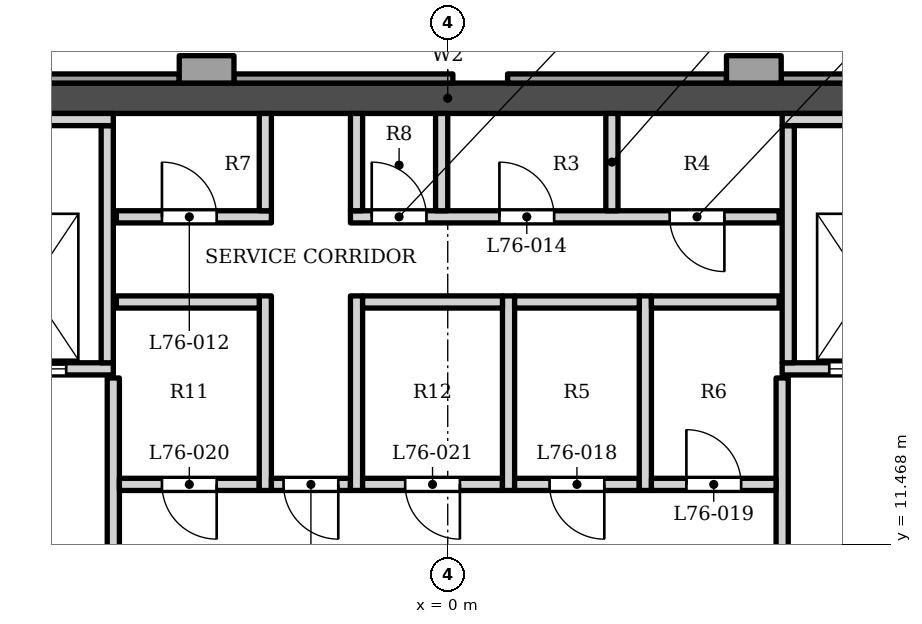
"""IFC4 building model, lengths in metres.
Left out: names, types, materials, properties, quantities, classifications, styles, units other than length and angle.
Written with IfcOpenShell. Run it as: python <this file> out.ifc"""

import sys

from ifc_helpers import new_model, si_unit, direction, frame, frame_2d, origin, place, context, subcontext, project, spatial, polyline, rectangle, outline, extrude, element, fill, save


model = new_model("IFC4")
c1 = context("Model", 3, precision=1e-05, world=origin(), true_north=direction((0.0, 1.0)))
c2 = subcontext(c1, "Body", "Model", "MODEL_VIEW")
j1 = project(units=[si_unit("LENGTHUNIT", "METRE"), si_unit("PLANEANGLEUNIT", "RADIAN")], contexts=[c1])
p1 = place(None, origin())
s1 = spatial("IfcSite", under=j1, at=p1, CompositionType="ELEMENT")
p2 = place(p1, origin())
s2 = spatial("IfcBuilding", under=s1, at=p2, CompositionType="ELEMENT")
p3 = place(p2, frame((0.0, 0.0, 325.5)))
s3 = spatial("IfcBuildingStorey", under=s2, at=p3, CompositionType="ELEMENT", Elevation=325.5)
p4 = place(p3, frame((-12.1, 18.802, 0.0), z_axis=(0.0, 0.0, 1.0), x_axis=(1.0, 0.0, 0.0)))
e1 = element("IfcWall", 1, at=p4, inside=s3, PredefinedType="SHEAR", context=c2, shape_type="SweptSolid", body=[
    extrude(rectangle(XDim=24.2, YDim=0.5, at=frame_2d((12.1, 0.0))), origin(), (0.0, 0.0, 1.0), 5.0),
])
p5 = place(p3, origin())
e2 = element("IfcWall", 2, at=p5, inside=s3, PredefinedType="SOLIDWALL", context=c2, shape_type="SweptSolid", body=[
    extrude(outline(polyline([(4.584, 19.502), (4.584, 19.052), (5.484, 19.052), (5.484, 19.502), (4.584, 19.502)])), origin(), (0.0, 0.0, 1.0), 3.8),
])
p6 = place(p3, origin())
e3 = element("IfcWall", 3, at=p6, inside=s3, PredefinedType="SOLIDWALL", context=c2, shape_type="SweptSolid", body=[
    extrude(outline(polyline([(-4.416, 19.502), (-4.416, 19.052), (-3.516, 19.052), (-3.516, 19.502), (-4.416, 19.502)])), origin(), (0.0, 0.0, 1.0), 3.8),
])
p7 = place(p3, origin())
e4 = element("IfcWall", 4, at=p7, inside=s3, PredefinedType="ELEMENTEDWALL", context=c2, shape_type="SweptSolid", body=[
    extrude(outline(polyline([(9.084, 19.203), (5.484, 19.203), (5.484, 19.052), (9.084, 19.052), (9.084, 19.203)])), origin(), (0.0, 0.0, 1.0), 3.8),
])
p8 = place(p3, origin())
e5 = element("IfcWall", 5, at=p8, inside=s3, PredefinedType="ELEMENTEDWALL", context=c2, shape_type="SweptSolid", body=[
    extrude(outline(polyline([(4.584, 19.203), (0.984, 19.203), (0.984, 19.052), (4.584, 19.052), (4.584, 19.203)])), origin(), (0.0, 0.0, 1.0), 3.8),
])
p9 = place(p3, origin())
e6 = element("IfcWall", 6, at=p9, inside=s3, PredefinedType="ELEMENTEDWALL", context=c2, shape_type="SweptSolid", body=[
    extrude(outline(polyline([(0.084, 19.203), (-3.516, 19.203), (-3.516, 19.052), (0.084, 19.052), (0.084, 19.203)])), origin(), (0.0, 0.0, 1.0), 3.8),
])
p10 = place(p3, origin())
e7 = element("IfcWall", 7, at=p10, inside=s3, PredefinedType="ELEMENTEDWALL", context=c2, shape_type="SweptSolid", body=[
    extrude(outline(polyline([(-4.416, 19.203), (-8.016, 19.203), (-8.016, 19.052), (-4.416, 19.052), (-4.416, 19.203)])), origin(), (0.0, 0.0, 1.0), 3.8),
])
p11 = place(p3, frame((-5.5, 6.353, 0.0), z_axis=(0.0, 0.0, 1.0), x_axis=(0.0, 1.0, 0.0)))
e8 = element("IfcWall", 8, at=p11, inside=s3, PredefinedType="SOLIDWALL", context=c2, shape_type="SweptSolid", body=[
    extrude(rectangle(XDim=7.85, YDim=0.2, at=frame_2d((3.925, 0.0))), origin(), (0.0, 0.0, 1.0), 4.8),
])
p12 = place(p11, frame((3.6, 0.0, 0.0)))
e9 = element("IfcOpeningElement", 9, at=p12, cuts=e8, PredefinedType="OPENING", context=c2, shape_type="SweptSolid", body=[
    extrude(rectangle(XDim=1.4, YDim=2.1, at=frame_2d((0.7, 1.05))), frame((0.0, 0.11, 0.0), z_axis=(0.0, -1.0, 0.0), x_axis=(1.0, 0.0, 0.0)), (0.0, 0.0, 1.0), 0.22),
])
p13 = place(p3, frame((5.5, 6.353, 0.0), z_axis=(0.0, 0.0, 1.0), x_axis=(0.0, 1.0, 0.0)))
e10 = element("IfcWall", 10, at=p13, inside=s3, PredefinedType="SOLIDWALL", context=c2, shape_type="SweptSolid", body=[
    extrude(rectangle(XDim=7.85, YDim=0.2, at=frame_2d((3.925, 0.0))), origin(), (0.0, 0.0, 1.0), 4.8),
])
p14 = place(p13, frame((3.6, 0.0, 0.0)))
e11 = element("IfcOpeningElement", 11, at=p14, cuts=e10, PredefinedType="OPENING", context=c2, shape_type="SweptSolid", body=[
    extrude(rectangle(XDim=1.4, YDim=2.1, at=frame_2d((0.7, 1.05))), frame((0.0, 0.11, 0.0), z_axis=(0.0, -1.0, 0.0), x_axis=(1.0, 0.0, 0.0)), (0.0, 0.0, 1.0), 0.22),
])
p15 = place(p3, frame((-5.4, 12.453, 0.0), z_axis=(0.0, 0.0, 1.0), x_axis=(1.0, 0.0, 0.0)))
e12 = element("IfcWall", 12, at=p15, inside=s3, PredefinedType="PARTITIONING", context=c2, shape_type="SweptSolid", body=[
    extrude(rectangle(XDim=2.3, YDim=0.2, at=frame_2d((1.15, 0.0))), origin(), (0.0, 0.0, 1.0), 4.8),
])
p16 = place(p15, frame((0.7, 0.0, 0.0)))
e13 = element("IfcOpeningElement", 13, at=p16, cuts=e12, PredefinedType="OPENING", context=c2, shape_type="SweptSolid", body=[
    extrude(rectangle(XDim=0.9, YDim=2.1, at=frame_2d((0.45, 1.05))), frame((0.0, 0.11, 0.0), z_axis=(0.0, -1.0, 0.0), x_axis=(1.0, 0.0, 0.0)), (0.0, 0.0, 1.0), 0.22),
])
p17 = place(p3, frame((-3.0, 12.353, 0.0), z_axis=(0.0, 0.0, 1.0), x_axis=(0.0, 1.0, 0.0)))
e14 = element("IfcWall", 14, at=p17, inside=s3, PredefinedType="PARTITIONING", context=c2, shape_type="SweptSolid", body=[
    extrude(rectangle(XDim=3.2, YDim=0.2, at=frame_2d((1.6, 0.0))), origin(), (0.0, 0.0, 1.0), 4.8),
])
p18 = place(p3, frame((-2.9, 12.453, 0.0), z_axis=(0.0, 0.0, 1.0), x_axis=(1.0, 0.0, 0.0)))
e15 = element("IfcWall", 15, at=p18, inside=s3, PredefinedType="PARTITIONING", context=c2, shape_type="SweptSolid", body=[
    extrude(rectangle(XDim=1.3, YDim=0.2, at=frame_2d((0.65, 0.0))), origin(), (0.0, 0.0, 1.0), 4.8),
])
p19 = place(p18, frame((0.2, 0.0, 0.0)))
e16 = element("IfcOpeningElement", 16, at=p19, cuts=e15, PredefinedType="OPENING", context=c2, shape_type="SweptSolid", body=[
    extrude(rectangle(XDim=0.9, YDim=2.1, at=frame_2d((0.45, 1.05))), frame((0.0, 0.11, 0.0), z_axis=(0.0, -1.0, 0.0), x_axis=(1.0, 0.0, 0.0)), (0.0, 0.0, 1.0), 0.22),
])
p20 = place(p3, frame((-1.5, 12.353, 0.0), z_axis=(0.0, 0.0, 1.0), x_axis=(0.0, 1.0, 0.0)))
e17 = element("IfcWall", 17, at=p20, inside=s3, PredefinedType="PARTITIONING", context=c2, shape_type="SweptSolid", body=[
    extrude(rectangle(XDim=3.2, YDim=0.2, at=frame_2d((1.6, 0.0))), origin(), (0.0, 0.0, 1.0), 4.8),
])
p21 = place(p3, frame((-1.4, 12.453, 0.0), z_axis=(0.0, 0.0, 1.0), x_axis=(1.0, 0.0, 0.0)))
e18 = element("IfcWall", 18, at=p21, inside=s3, PredefinedType="PARTITIONING", context=c2, shape_type="SweptSolid", body=[
    extrude(rectangle(XDim=2.3, YDim=0.2, at=frame_2d((1.15, 0.0))), origin(), (0.0, 0.0, 1.0), 4.8),
])
p22 = place(p21, frame((0.7, 0.0, 0.0)))
e19 = element("IfcOpeningElement", 19, at=p22, cuts=e18, PredefinedType="OPENING", context=c2, shape_type="SweptSolid", body=[
    extrude(rectangle(XDim=0.9, YDim=2.1, at=frame_2d((0.45, 1.05))), frame((0.0, 0.11, 0.0), z_axis=(0.0, -1.0, 0.0), x_axis=(1.0, 0.0, 0.0)), (0.0, 0.0, 1.0), 0.22),
])
p23 = place(p3, frame((1.0, 12.353, 0.0), z_axis=(0.0, 0.0, 1.0), x_axis=(0.0, 1.0, 0.0)))
e20 = element("IfcWall", 20, at=p23, inside=s3, PredefinedType="PARTITIONING", context=c2, shape_type="SweptSolid", body=[
    extrude(rectangle(XDim=3.2, YDim=0.2, at=frame_2d((1.6, 0.0))), origin(), (0.0, 0.0, 1.0), 4.8),
])
p24 = place(p3, frame((1.1, 12.453, 0.0), z_axis=(0.0, 0.0, 1.0), x_axis=(1.0, 0.0, 0.0)))
e21 = element("IfcWall", 21, at=p24, inside=s3, PredefinedType="PARTITIONING", context=c2, shape_type="SweptSolid", body=[
    extrude(rectangle(XDim=2.05, YDim=0.2, at=frame_2d((1.025, 0.0))), origin(), (0.0, 0.0, 1.0), 4.8),
])
p25 = place(p24, frame((0.575, 0.0, 0.0)))
e22 = element("IfcOpeningElement", 22, at=p25, cuts=e21, PredefinedType="OPENING", context=c2, shape_type="SweptSolid", body=[
    extrude(rectangle(XDim=0.9, YDim=2.1, at=frame_2d((0.45, 1.05))), frame((0.0, 0.11, 0.0), z_axis=(0.0, -1.0, 0.0), x_axis=(1.0, 0.0, 0.0)), (0.0, 0.0, 1.0), 0.22),
])
p26 = place(p3, frame((3.25, 12.353, 0.0), z_axis=(0.0, 0.0, 1.0), x_axis=(0.0, 1.0, 0.0)))
e23 = element("IfcWall", 23, at=p26, inside=s3, PredefinedType="PARTITIONING", context=c2, shape_type="SweptSolid", body=[
    extrude(rectangle(XDim=3.2, YDim=0.2, at=frame_2d((1.6, 0.0))), origin(), (0.0, 0.0, 1.0), 4.8),
])
p27 = place(p3, frame((3.35, 12.453, 0.0), z_axis=(0.0, 0.0, 1.0), x_axis=(1.0, 0.0, 0.0)))
e24 = element("IfcWall", 24, at=p27, inside=s3, PredefinedType="PARTITIONING", context=c2, shape_type="SweptSolid", body=[
    extrude(rectangle(XDim=2.05, YDim=0.2, at=frame_2d((1.025, 0.0))), origin(), (0.0, 0.0, 1.0), 4.8),
])
p28 = place(p27, frame((0.575, 0.0, 0.0)))
e25 = element("IfcOpeningElement", 25, at=p28, cuts=e24, PredefinedType="OPENING", context=c2, shape_type="SweptSolid", body=[
    extrude(rectangle(XDim=0.9, YDim=2.1, at=frame_2d((0.45, 1.05))), frame((0.0, 0.11, 0.0), z_axis=(0.0, -1.0, 0.0), x_axis=(1.0, 0.0, 0.0)), (0.0, 0.0, 1.0), 0.22),
])
p29 = place(p3, frame((-8.05, 14.353, 0.0), z_axis=(0.0, 0.0, 1.0), x_axis=(1.0, 0.0, 0.0)))
e26 = element("IfcWall", 26, at=p29, inside=s3, PredefinedType="SOLIDWALL", context=c2, shape_type="SweptSolid", body=[
    extrude(rectangle(XDim=2.55, YDim=0.2, at=frame_2d((1.275, 0.0))), origin(), (0.0, 0.0, 1.0), 4.8),
])
p30 = place(p29, frame((0.575, 0.0, 0.0)))
e27 = element("IfcOpeningElement", 27, at=p30, cuts=e26, PredefinedType="OPENING", context=c2, shape_type="SweptSolid", body=[
    extrude(rectangle(XDim=1.2, YDim=2.1, at=frame_2d((0.6, 1.05))), frame((0.0, 0.11, 0.0), z_axis=(0.0, -1.0, 0.0), x_axis=(1.0, 0.0, 0.0)), (0.0, 0.0, 1.0), 0.22),
])
p31 = place(p3, frame((5.5, 14.353, 0.0), z_axis=(0.0, 0.0, 1.0), x_axis=(1.0, 0.0, 0.0)))
e28 = element("IfcWall", 28, at=p31, inside=s3, PredefinedType="SOLIDWALL", context=c2, shape_type="SweptSolid", body=[
    extrude(rectangle(XDim=2.55, YDim=0.2, at=frame_2d((1.275, 0.0))), origin(), (0.0, 0.0, 1.0), 4.8),
])
p32 = place(p31, frame((0.775, 0.0, 0.0)))
e29 = element("IfcOpeningElement", 29, at=p32, cuts=e28, PredefinedType="OPENING", context=c2, shape_type="SweptSolid", body=[
    extrude(rectangle(XDim=1.2, YDim=2.1, at=frame_2d((0.6, 1.05))), frame((0.0, 0.11, 0.0), z_axis=(0.0, -1.0, 0.0), x_axis=(1.0, 0.0, 0.0)), (0.0, 0.0, 1.0), 0.22),
])
for number, where, z_axis, x_axis in (
    (30, (-5.6, 14.453, 0.0), (0.0, 0.0, 1.0), (0.0, 1.0, 0.0)),
    (31, (5.6, 14.453, 0.0), (0.0, 0.0, 1.0), (0.0, 1.0, 0.0)),
):
    element("IfcWall", number, at=place(p3, frame(where, z_axis=z_axis, x_axis=x_axis)), inside=s3, PredefinedType="SOLIDWALL", context=c2, shape_type="SweptSolid", body=[
        extrude(rectangle(XDim=3.9, YDim=0.2, at=frame_2d((1.95, 0.0))), origin(), (0.0, 0.0, 1.0), 4.8),
    ])
p33 = place(p3, frame((-5.45, 15.453, 0.0), z_axis=(0.0, 0.0, 1.0), x_axis=(1.0, 0.0, 0.0)))
e32 = element("IfcWall", 32, at=p33, inside=s3, PredefinedType="SOLIDWALL", context=c2, shape_type="SweptSolid", body=[
    extrude(rectangle(XDim=2.35, YDim=0.2, at=frame_2d((1.175, 0.0))), origin(), (0.0, 0.0, 1.0), 4.8),
])
p34 = place(p3, frame((-1.4, 15.453, 0.0), z_axis=(0.0, 0.0, 1.0), x_axis=(1.0, 0.0, 0.0)))
e33 = element("IfcWall", 33, at=p34, inside=s3, PredefinedType="PARTITIONING", context=c2, shape_type="SweptSolid", body=[
    extrude(rectangle(XDim=2.3, YDim=0.2, at=frame_2d((1.15, 0.0))), origin(), (0.0, 0.0, 1.0), 4.8),
])
p35 = place(p3, frame((1.1, 15.453, 0.0), z_axis=(0.0, 0.0, 1.0), x_axis=(1.0, 0.0, 0.0)))
e34 = element("IfcWall", 34, at=p35, inside=s3, PredefinedType="PARTITIONING", context=c2, shape_type="SweptSolid", body=[
    extrude(rectangle(XDim=2.05, YDim=0.2, at=frame_2d((1.025, 0.0))), origin(), (0.0, 0.0, 1.0), 4.8),
])
p36 = place(p3, frame((3.35, 15.453, 0.0), z_axis=(0.0, 0.0, 1.0), x_axis=(1.0, 0.0, 0.0)))
e35 = element("IfcWall", 35, at=p36, inside=s3, PredefinedType="SOLIDWALL", context=c2, shape_type="SweptSolid", body=[
    extrude(rectangle(XDim=2.1, YDim=0.2, at=frame_2d((1.05, 0.0))), origin(), (0.0, 0.0, 1.0), 4.8),
])
p37 = place(p3, frame((-5.45, 16.853, 0.0), z_axis=(0.0, 0.0, 1.0), x_axis=(1.0, 0.0, 0.0)))
e36 = element("IfcWall", 36, at=p37, inside=s3, PredefinedType="SOLIDWALL", context=c2, shape_type="SweptSolid", body=[
    extrude(rectangle(XDim=2.55, YDim=0.2, at=frame_2d((1.275, 0.0))), origin(), (0.0, 0.0, 1.0), 4.8),
])
p38 = place(p37, frame((0.75, 0.0, 0.0)))
e37 = element("IfcOpeningElement", 37, at=p38, cuts=e36, PredefinedType="OPENING", context=c2, shape_type="SweptSolid", body=[
    extrude(rectangle(XDim=0.9, YDim=2.1, at=frame_2d((0.45, 1.05))), frame((0.0, 0.11, 0.0), z_axis=(0.0, -1.0, 0.0), x_axis=(1.0, 0.0, 0.0)), (0.0, 0.0, 1.0), 0.22),
])
p39 = place(p3, frame((-1.6, 16.853, 0.0), z_axis=(0.0, 0.0, 1.0), x_axis=(1.0, 0.0, 0.0)))
e38 = element("IfcWall", 38, at=p39, inside=s3, PredefinedType="SOLIDWALL", context=c2, shape_type="SweptSolid", body=[
    extrude(rectangle(XDim=7.05, YDim=0.2, at=frame_2d((3.525, 0.0))), origin(), (0.0, 0.0, 1.0), 4.8),
])
p40 = place(p39, frame((0.35, 0.0, 0.0)))
e39 = element("IfcOpeningElement", 39, at=p40, cuts=e38, PredefinedType="OPENING", context=c2, shape_type="SweptSolid", body=[
    extrude(rectangle(XDim=0.9, YDim=2.1, at=frame_2d((0.45, 1.05))), frame((0.0, 0.11, 0.0), z_axis=(0.0, -1.0, 0.0), x_axis=(1.0, 0.0, 0.0)), (0.0, 0.0, 1.0), 0.22),
])
p41 = place(p39, frame((2.45, 0.0, 0.0)))
e40 = element("IfcOpeningElement", 40, at=p41, cuts=e38, PredefinedType="OPENING", context=c2, shape_type="SweptSolid", body=[
    extrude(rectangle(XDim=0.9, YDim=2.1, at=frame_2d((0.45, 1.05))), frame((0.0, 0.11, 0.0), z_axis=(0.0, -1.0, 0.0), x_axis=(1.0, 0.0, 0.0)), (0.0, 0.0, 1.0), 0.22),
])
p42 = place(p39, frame((5.25, 0.0, 0.0)))
e41 = element("IfcOpeningElement", 41, at=p42, cuts=e38, PredefinedType="OPENING", context=c2, shape_type="SweptSolid", body=[
    extrude(rectangle(XDim=0.9, YDim=2.1, at=frame_2d((0.45, 1.05))), frame((0.0, 0.11, 0.0), z_axis=(0.0, -1.0, 0.0), x_axis=(1.0, 0.0, 0.0)), (0.0, 0.0, 1.0), 0.22),
])
for number, where, z_axis, x_axis in (
    (42, (-3.0, 16.953, 0.0), (0.0, 0.0, 1.0), (0.0, 1.0, 0.0)),
    (43, (-1.5, 16.953, 0.0), (0.0, 0.0, 1.0), (0.0, 1.0, 0.0)),
    (44, (-0.1, 16.953, 0.0), (0.0, 0.0, 1.0), (0.0, 1.0, 0.0)),
    (45, (2.7, 16.953, 0.0), (0.0, 0.0, 1.0), (0.0, 1.0, 0.0)),
):
    element("IfcWall", number, at=place(p3, frame(where, z_axis=z_axis, x_axis=x_axis)), inside=s3, PredefinedType="PARTITIONING", context=c2, shape_type="SweptSolid", body=[
        extrude(rectangle(XDim=1.6, YDim=0.2, at=frame_2d((0.8, 0.0))), origin(), (0.0, 0.0, 1.0), 4.8),
    ])
for number, where, z_axis, x_axis in (
    (46, (-8.05, 18.453, 0.0), (0.0, 0.0, 1.0), (1.0, 0.0, 0.0)),
    (47, (5.5, 18.453, 0.0), (0.0, 0.0, 1.0), (1.0, 0.0, 0.0)),
):
    element("IfcWall", number, at=place(p3, frame(where, z_axis=z_axis, x_axis=x_axis)), inside=s3, PredefinedType="SOLIDWALL", context=c2, shape_type="SweptSolid", body=[
        extrude(rectangle(XDim=2.55, YDim=0.2, at=frame_2d((1.275, 0.0))), origin(), (0.0, 0.0, 1.0), 4.8),
    ])
p43 = place(p30, origin())
e48 = element("IfcDoor", 48, at=p43, inside=s3, OperationType="DOUBLE_DOOR_SLIDING", PredefinedType="DOOR", context=c2, shape_type="SweptSolid", body=[
    extrude(rectangle(XDim=1.2, YDim=2.1, at=frame_2d((0.6, 1.05))), frame((0.0, 0.025, 0.0), z_axis=(0.0, -1.0, 0.0), x_axis=(1.0, 0.0, 0.0)), (0.0, 0.0, 1.0), 0.05),
])
fill(e27, e48)
p44 = place(p32, origin())
e49 = element("IfcDoor", 49, at=p44, inside=s3, OperationType="DOUBLE_DOOR_SLIDING", PredefinedType="DOOR", context=c2, shape_type="SweptSolid", body=[
    extrude(rectangle(XDim=1.2, YDim=2.1, at=frame_2d((0.6, 1.05))), frame((0.0, 0.025, 0.0), z_axis=(0.0, -1.0, 0.0), x_axis=(1.0, 0.0, 0.0)), (0.0, 0.0, 1.0), 0.05),
])
fill(e29, e49)
p45 = place(p19, origin())
e50 = element("IfcDoor", 50, at=p45, inside=s3, OperationType="SINGLE_SWING_RIGHT", PredefinedType="DOOR", context=c2, shape_type="SweptSolid", body=[
    extrude(rectangle(XDim=0.9, YDim=2.1, at=frame_2d((0.45, 1.05))), frame((0.0, 0.025, 0.0), z_axis=(0.0, -1.0, 0.0), x_axis=(1.0, 0.0, 0.0)), (0.0, 0.0, 1.0), 0.05),
])
fill(e16, e50)
p46 = place(p38, origin())
e51 = element("IfcDoor", 51, at=p46, inside=s3, OperationType="SINGLE_SWING_LEFT", PredefinedType="DOOR", context=c2, shape_type="SweptSolid", body=[
    extrude(rectangle(XDim=0.9, YDim=2.1, at=frame_2d((0.45, 1.05))), frame((0.0, 0.025, 0.0), z_axis=(0.0, -1.0, 0.0), x_axis=(1.0, 0.0, 0.0)), (0.0, 0.0, 1.0), 0.05),
])
fill(e37, e51)
p47 = place(p40, origin())
e52 = element("IfcDoor", 52, at=p47, inside=s3, OperationType="SINGLE_SWING_LEFT", PredefinedType="DOOR", context=c2, shape_type="SweptSolid", body=[
    extrude(rectangle(XDim=0.9, YDim=2.1, at=frame_2d((0.45, 1.05))), frame((0.0, 0.025, 0.0), z_axis=(0.0, -1.0, 0.0), x_axis=(1.0, 0.0, 0.0)), (0.0, 0.0, 1.0), 0.05),
])
fill(e39, e52)
p48 = place(p41, origin())
e53 = element("IfcDoor", 53, at=p48, inside=s3, OperationType="SINGLE_SWING_LEFT", PredefinedType="DOOR", context=c2, shape_type="SweptSolid", body=[
    extrude(rectangle(XDim=0.9, YDim=2.1, at=frame_2d((0.45, 1.05))), frame((0.0, 0.025, 0.0), z_axis=(0.0, -1.0, 0.0), x_axis=(1.0, 0.0, 0.0)), (0.0, 0.0, 1.0), 0.05),
])
fill(e40, e53)
p49 = place(p42, origin())
e54 = element("IfcDoor", 54, at=p49, inside=s3, OperationType="SINGLE_SWING_RIGHT", PredefinedType="DOOR", context=c2, shape_type="SweptSolid", body=[
    extrude(rectangle(XDim=0.9, YDim=2.1, at=frame_2d((0.45, 1.05))), frame((0.0, 0.025, 0.0), z_axis=(0.0, -1.0, 0.0), x_axis=(1.0, 0.0, 0.0)), (0.0, 0.0, 1.0), 0.05),
])
fill(e41, e54)
p50 = place(p25, origin())
e55 = element("IfcDoor", 55, at=p50, inside=s3, OperationType="SINGLE_SWING_RIGHT", PredefinedType="DOOR", context=c2, shape_type="SweptSolid", body=[
    extrude(rectangle(XDim=0.9, YDim=2.1, at=frame_2d((0.45, 1.05))), frame((0.0, 0.025, 0.0), z_axis=(0.0, -1.0, 0.0), x_axis=(1.0, 0.0, 0.0)), (0.0, 0.0, 1.0), 0.05),
])
fill(e22, e55)
p51 = place(p28, origin())
e56 = element("IfcDoor", 56, at=p51, inside=s3, OperationType="SINGLE_SWING_LEFT", PredefinedType="DOOR", context=c2, shape_type="SweptSolid", body=[
    extrude(rectangle(XDim=0.9, YDim=2.1, at=frame_2d((0.45, 1.05))), frame((0.0, 0.025, 0.0), z_axis=(0.0, -1.0, 0.0), x_axis=(1.0, 0.0, 0.0)), (0.0, 0.0, 1.0), 0.05),
])
fill(e25, e56)
p52 = place(p16, origin())
e57 = element("IfcDoor", 57, at=p52, inside=s3, OperationType="SINGLE_SWING_RIGHT", PredefinedType="DOOR", context=c2, shape_type="SweptSolid", body=[
    extrude(rectangle(XDim=0.9, YDim=2.1, at=frame_2d((0.45, 1.05))), frame((0.0, 0.025, 0.0), z_axis=(0.0, -1.0, 0.0), x_axis=(1.0, 0.0, 0.0)), (0.0, 0.0, 1.0), 0.05),
])
fill(e13, e57)
p53 = place(p22, origin())
e58 = element("IfcDoor", 58, at=p53, inside=s3, OperationType="SINGLE_SWING_RIGHT", PredefinedType="DOOR", context=c2, shape_type="SweptSolid", body=[
    extrude(rectangle(XDim=0.9, YDim=2.1, at=frame_2d((0.45, 1.05))), frame((0.0, 0.025, 0.0), z_axis=(0.0, -1.0, 0.0), x_axis=(1.0, 0.0, 0.0)), (0.0, 0.0, 1.0), 0.05),
])
fill(e19, e58)
save(model, sys.argv[1])
